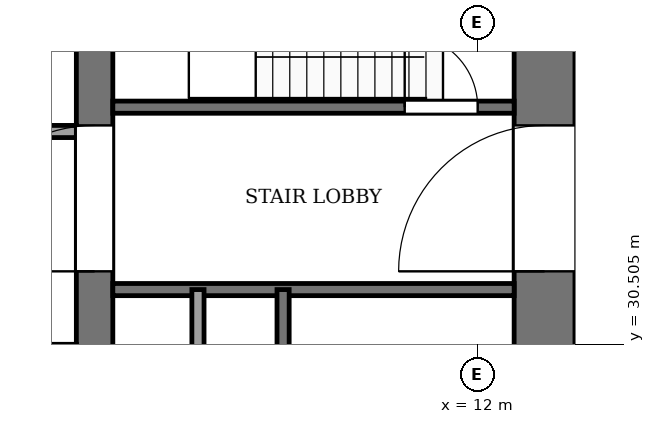
"""IFC4 building model, lengths in metres.
Left out: names, types, materials, properties, quantities, classifications, styles, units other than length and angle.
Written with IfcOpenShell. Run it as: python <this file> out.ifc"""

import sys

from ifc_helpers import new_model, si_unit, direction, frame, frame_2d, origin, place, context, subcontext, project, spatial, rectangle, extrude, element, fill, save


model = new_model("IFC4")
c1 = context("Model", 3, precision=1e-05, world=origin(), true_north=direction((0.0, 1.0)))
c2 = subcontext(c1, "Body", "Model", "MODEL_VIEW")
j1 = project(units=[si_unit("LENGTHUNIT", "METRE"), si_unit("PLANEANGLEUNIT", "RADIAN")], contexts=[c1])
p1 = place(None, origin())
s1 = spatial("IfcSite", under=j1, at=p1, CompositionType="ELEMENT")
p2 = place(p1, origin())
s2 = spatial("IfcBuilding", under=s1, at=p2, CompositionType="ELEMENT")
p3 = place(p2, frame((0.0, 0.0, 126.0)))
s3 = spatial("IfcBuildingStorey", under=s2, at=p3, CompositionType="ELEMENT", Elevation=126.0)
p4 = place(p3, frame((13.1, 18.4, -0.13), z_axis=(0.0, 0.0, 1.0), x_axis=(0.0, 1.0, 0.0)))
e1 = element("IfcWall", 1, at=p4, inside=s3, PredefinedType="SHEAR", context=c2, shape_type="SweptSolid", body=[
    extrude(rectangle(XDim=19.2, YDim=1.0, at=frame_2d((9.6, 0.0))), origin(), (0.0, 0.0, 1.0), 4.0),
])
p5 = place(p4, frame((2.8, 0.0, 0.13)))
e2 = element("IfcOpeningElement", 2, at=p5, cuts=e1, PredefinedType="OPENING", context=c2, shape_type="SweptSolid", body=[
    extrude(rectangle(XDim=2.4, YDim=2.4, at=frame_2d((1.2, 1.2))), frame((0.0, 0.51, 0.0), z_axis=(0.0, -1.0, 0.0), x_axis=(1.0, 0.0, 0.0)), (0.0, 0.0, 1.0), 1.02),
])
p6 = place(p4, frame((13.3, 0.0, 0.13)))
e3 = element("IfcOpeningElement", 3, at=p6, cuts=e1, PredefinedType="OPENING", context=c2, shape_type="SweptSolid", body=[
    extrude(rectangle(XDim=2.4, YDim=2.4, at=frame_2d((1.2, 1.2))), frame((0.0, 0.51, 0.0), z_axis=(0.0, -1.0, 0.0), x_axis=(1.0, 0.0, 0.0)), (0.0, 0.0, 1.0), 1.02),
])
p7 = place(p3, frame((5.7, 18.4, -0.13), z_axis=(0.0, 0.0, 1.0), x_axis=(0.0, 1.0, 0.0)))
e4 = element("IfcWall", 4, at=p7, inside=s3, PredefinedType="SHEAR", context=c2, shape_type="SweptSolid", body=[
    extrude(rectangle(XDim=19.2, YDim=0.6, at=frame_2d((9.6, 0.0))), origin(), (0.0, 0.0, 1.0), 4.0),
])
p8 = place(p7, frame((13.3, 0.0, 0.13)))
e5 = element("IfcOpeningElement", 5, at=p8, cuts=e4, PredefinedType="OPENING", context=c2, shape_type="SweptSolid", body=[
    extrude(rectangle(XDim=2.4, YDim=2.4, at=frame_2d((1.2, 1.2))), frame((0.0, 0.31, 0.0), z_axis=(0.0, -1.0, 0.0), x_axis=(1.0, 0.0, 0.0)), (0.0, 0.0, 1.0), 0.62),
])
p9 = place(p3, frame((6.0, 31.4, 0.0), z_axis=(0.0, 0.0, 1.0), x_axis=(1.0, 0.0, 0.0)))
e6 = element("IfcWall", 6, at=p9, inside=s3, PredefinedType="PARTITIONING", context=c2, shape_type="SweptSolid", body=[
    extrude(rectangle(XDim=6.6, YDim=0.2, at=frame_2d((3.3, 0.0))), origin(), (0.0, 0.0, 1.0), 3.87),
])
p10 = place(p3, frame((-5.4, 34.0, 0.0), z_axis=(0.0, 0.0, 1.0), x_axis=(1.0, 0.0, 0.0)))
e7 = element("IfcWall", 7, at=p10, inside=s3, PredefinedType="PARTITIONING", context=c2, shape_type="SweptSolid", body=[
    extrude(rectangle(XDim=10.8, YDim=0.2, at=frame_2d((5.4, 0.0))), origin(), (0.0, 0.0, 1.0), 3.87),
])
p11 = place(p10, frame((6.15, 0.0, 0.0)))
e8 = element("IfcOpeningElement", 8, at=p11, cuts=e7, PredefinedType="OPENING", context=c2, shape_type="SweptSolid", body=[
    extrude(rectangle(XDim=1.2, YDim=2.2, at=frame_2d((0.6, 1.1))), frame((0.0, 0.11, 0.0), z_axis=(0.0, -1.0, 0.0), x_axis=(1.0, 0.0, 0.0)), (0.0, 0.0, 1.0), 0.22),
])
p12 = place(p10, frame((8.95, 0.0, 0.0)))
e9 = element("IfcOpeningElement", 9, at=p12, cuts=e7, PredefinedType="OPENING", context=c2, shape_type="SweptSolid", body=[
    extrude(rectangle(XDim=1.0, YDim=2.1, at=frame_2d((0.5, 1.05))), frame((0.0, 0.11, 0.0), z_axis=(0.0, -1.0, 0.0), x_axis=(1.0, 0.0, 0.0)), (0.0, 0.0, 1.0), 0.22),
])
p13 = place(p3, frame((6.0, 34.4, 0.0), z_axis=(0.0, 0.0, 1.0), x_axis=(1.0, 0.0, 0.0)))
e10 = element("IfcWall", 10, at=p13, inside=s3, PredefinedType="PARTITIONING", context=c2, shape_type="SweptSolid", body=[
    extrude(rectangle(XDim=6.6, YDim=0.2, at=frame_2d((3.3, 0.0))), origin(), (0.0, 0.0, 1.0), 3.87),
])
p14 = place(p13, frame((4.8, 0.0, 0.0)))
e11 = element("IfcOpeningElement", 11, at=p14, cuts=e10, PredefinedType="OPENING", context=c2, shape_type="SweptSolid", body=[
    extrude(rectangle(XDim=1.2, YDim=2.2, at=frame_2d((0.6, 1.1))), frame((0.0, 0.11, 0.0), z_axis=(0.0, -1.0, 0.0), x_axis=(1.0, 0.0, 0.0)), (0.0, 0.0, 1.0), 0.22),
])
for number, where, z_axis, x_axis in (
    (12, (7.4, 24.0, 0.0), (0.0, 0.0, 1.0), (0.0, 1.0, 0.0)),
    (13, (8.8, 24.0, 0.0), (0.0, 0.0, 1.0), (0.0, 1.0, 0.0)),
):
    element("IfcWall", number, at=place(p3, frame(where, z_axis=z_axis, x_axis=x_axis)), inside=s3, PredefinedType="PARTITIONING", context=c2, shape_type="SweptSolid", body=[
        extrude(rectangle(XDim=7.4, YDim=0.2, at=frame_2d((3.7, 0.0))), origin(), (0.0, 0.0, 1.0), 3.87),
    ])
p15 = place(p14, origin())
e14 = element("IfcDoor", 14, at=p15, inside=s3, OperationType="SINGLE_SWING_RIGHT", PredefinedType="DOOR", context=c2, shape_type="SweptSolid", body=[
    extrude(rectangle(XDim=1.2, YDim=2.2, at=frame_2d((0.6, 1.1))), frame((0.0, 0.025, 0.0), z_axis=(0.0, -1.0, 0.0), x_axis=(1.0, 0.0, 0.0)), (0.0, 0.0, 1.0), 0.05),
])
fill(e11, e14)
p16 = place(p8, origin())
e15 = element("IfcDoor", 15, at=p16, inside=s3, OperationType="DOUBLE_DOOR_SINGLE_SWING", PredefinedType="DOOR", context=c2, shape_type="SweptSolid", body=[
    extrude(rectangle(XDim=2.4, YDim=2.4, at=frame_2d((1.2, 1.2))), frame((0.0, 0.025, 0.0), z_axis=(0.0, -1.0, 0.0), x_axis=(1.0, 0.0, 0.0)), (0.0, 0.0, 1.0), 0.05),
])
fill(e5, e15)
p17 = place(p6, origin())
e16 = element("IfcDoor", 16, at=p17, inside=s3, OperationType="DOUBLE_DOOR_SINGLE_SWING", PredefinedType="DOOR", context=c2, shape_type="SweptSolid", body=[
    extrude(rectangle(XDim=2.4, YDim=2.4, at=frame_2d((1.2, 1.2))), frame((0.0, 0.025, 0.0), z_axis=(0.0, -1.0, 0.0), x_axis=(1.0, 0.0, 0.0)), (0.0, 0.0, 1.0), 0.05),
])
fill(e3, e16)
save(model, sys.argv[1])
